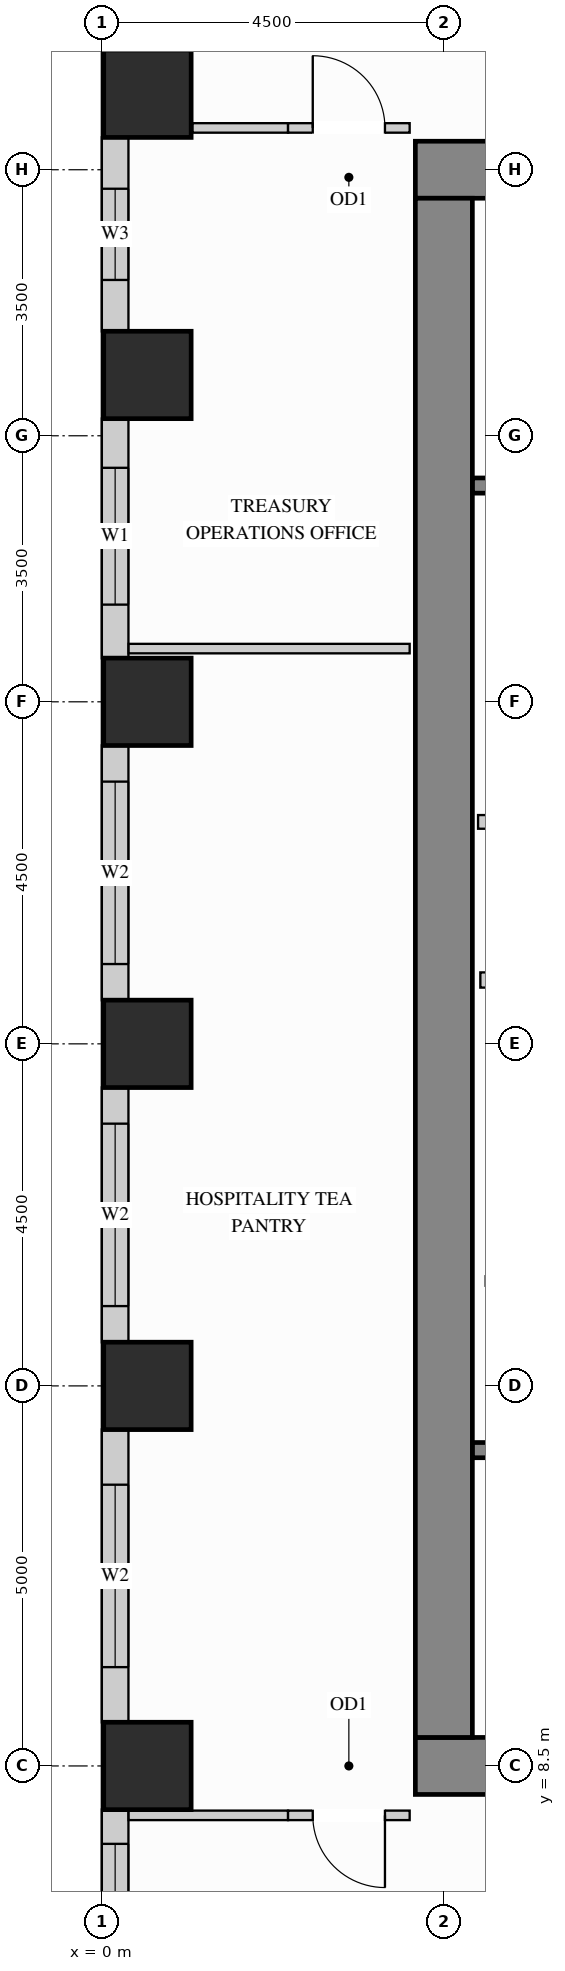
"""IFC4 building model, lengths in metres.
Left out: names, types, materials, properties, quantities, classifications, styles, units other than length and angle.
Written with IfcOpenShell. Run it as: python <this file> out.ifc"""

import sys

from ifc_helpers import new_model, si_unit, direction, frame, frame_2d, origin, origin_2d, place, context, subcontext, project, spatial, rectangle, extrude, source, transform, mapped, element, fill, save


model = new_model("IFC4")
c1 = context("Model", 3, precision=1e-05, world=origin(), true_north=direction((0.0, 1.0)))
c2 = subcontext(c1, "Body", "Model", "MODEL_VIEW")
j1 = project(units=[si_unit("LENGTHUNIT", "METRE"), si_unit("PLANEANGLEUNIT", "RADIAN")], contexts=[c1])
p1 = place(None, origin())
s1 = spatial("IfcSite", under=j1, at=p1, CompositionType="ELEMENT")
p2 = place(p1, origin())
s2 = spatial("IfcBuilding", under=s1, at=p2, CompositionType="ELEMENT")
p3 = place(p2, frame((0.0, 0.0, 124.2)))
s3 = spatial("IfcBuildingStorey", under=s2, at=p3, CompositionType="ELEMENT", Elevation=124.2)
m1 = source(origin(), c2, "Body", "SweptSolid", [
    extrude(rectangle(XDim=1.15, YDim=1.15, at=origin_2d()), origin(), (0.0, 0.0, 1.0), 3.38),
])
for number, where, z_axis, x_axis in (
    (1, (0.6, 13.5, 0.0), (0.0, 0.0, 1.0), (1.0, 0.0, 0.0)),
    (2, (0.6, 18.0, 0.0), (0.0, 0.0, 1.0), (1.0, 0.0, 0.0)),
    (3, (0.6, 22.5, 0.0), (0.0, 0.0, 1.0), (1.0, 0.0, 0.0)),
    (4, (0.6, 26.8, 0.0), (0.0, 0.0, 1.0), (1.0, 0.0, 0.0)),
    (5, (0.6, 30.5, 0.0), (0.0, 0.0, 1.0), (1.0, 0.0, 0.0)),
    (6, (0.6, 8.5, 0.0), (0.0, 0.0, 1.0), (1.0, 0.0, 0.0)),
):
    element("IfcColumn", number, at=place(p3, frame(where, z_axis=z_axis, x_axis=x_axis)), inside=s3, PredefinedType="COLUMN", context=c2, shape_type="MappedRepresentation", body=[
        mapped(m1, transform((0.0, 0.0, 0.0), x_axis=(1.0, 0.0, 0.0), y_axis=(0.0, 1.0, 0.0), z_axis=(0.0, 0.0, 1.0))),
    ])
m2 = source(origin(), c2, "Body", "SweptSolid", [
    extrude(rectangle(XDim=10.75, YDim=0.75, at=frame_2d((5.375, 0.0))), origin(), (0.0, 0.0, 1.0), 3.38),
])
for number, where, z_axis, x_axis in (
    (7, (4.125, 29.5, 0.0), (0.0, 0.0, 1.0), (1.0, 0.0, 0.0)),
    (8, (4.125, 8.5, 0.0), (0.0, 0.0, 1.0), (1.0, 0.0, 0.0)),
):
    element("IfcWall", number, at=place(p3, frame(where, z_axis=z_axis, x_axis=x_axis)), inside=s3, PredefinedType="SHEAR", context=c2, shape_type="MappedRepresentation", body=[
        mapped(m2, transform((0.0, 0.0, 0.0), x_axis=(1.0, 0.0, 0.0), y_axis=(0.0, 1.0, 0.0), z_axis=(0.0, 0.0, 1.0))),
    ])
m3 = source(origin(), c2, "Body", "SweptSolid", [
    extrude(rectangle(XDim=20.25, YDim=0.75, at=frame_2d((10.125, 0.0))), origin(), (0.0, 0.0, 1.0), 3.38),
])
p4 = place(p3, frame((4.5, 8.875, 0.0), z_axis=(0.0, 0.0, 1.0), x_axis=(0.0, 1.0, 0.0)))
e9 = element("IfcWall", 9, at=p4, inside=s3, PredefinedType="SHEAR", context=c2, shape_type="MappedRepresentation", body=[
    mapped(m3, transform((0.0, 0.0, 0.0), x_axis=(1.0, 0.0, 0.0), y_axis=(0.0, 1.0, 0.0), z_axis=(0.0, 0.0, 1.0))),
])
p5 = place(p3, frame((0.175, 29.927, 0.0), z_axis=(0.0, 0.0, 1.0), x_axis=(0.0, -1.0, 0.0)))
e10 = element("IfcWall", 10, at=p5, inside=s3, PredefinedType="SOLIDWALL", context=c2, shape_type="SweptSolid", body=[
    extrude(rectangle(XDim=2.554, YDim=0.35, at=frame_2d((1.277, 0.0))), origin(), (0.0, 0.0, 1.0), 3.365),
])
p6 = place(p5, frame((0.677, 0.0, 0.78)))
e11 = element("IfcOpeningElement", 11, at=p6, cuts=e10, PredefinedType="OPENING", context=c2, shape_type="SweptSolid", body=[
    extrude(rectangle(XDim=1.2, YDim=2.1, at=frame_2d((0.6, 1.05))), frame((0.0, 0.185, 0.0), z_axis=(0.0, -1.0, 0.0), x_axis=(1.0, 0.0, 0.0)), (0.0, 0.0, 1.0), 0.37),
])
p7 = place(p3, frame((0.175, 26.227, 0.0), z_axis=(0.0, 0.0, 1.0), x_axis=(0.0, -1.0, 0.0)))
e12 = element("IfcWall", 12, at=p7, inside=s3, PredefinedType="SOLIDWALL", context=c2, shape_type="SweptSolid", body=[
    extrude(rectangle(XDim=3.154, YDim=0.35, at=frame_2d((1.577, 0.0))), origin(), (0.0, 0.0, 1.0), 3.365),
])
p8 = place(p7, frame((0.648, 0.0, 0.78)))
e13 = element("IfcOpeningElement", 13, at=p8, cuts=e12, PredefinedType="OPENING", context=c2, shape_type="SweptSolid", body=[
    extrude(rectangle(XDim=1.8, YDim=2.1, at=frame_2d((0.9, 1.05))), frame((0.0, 0.185, 0.0), z_axis=(0.0, -1.0, 0.0), x_axis=(1.0, 0.0, 0.0)), (0.0, 0.0, 1.0), 0.37),
])
p9 = place(p3, frame((0.175, 21.927, 0.0), z_axis=(0.0, 0.0, 1.0), x_axis=(0.0, -1.0, 0.0)))
e14 = element("IfcWall", 14, at=p9, inside=s3, PredefinedType="SOLIDWALL", context=c2, shape_type="SweptSolid", body=[
    extrude(rectangle(XDim=3.354, YDim=0.35, at=frame_2d((1.677, 0.0))), origin(), (0.0, 0.0, 1.0), 3.365),
])
p10 = place(p9, frame((0.477, 0.0, 0.78)))
e15 = element("IfcOpeningElement", 15, at=p10, cuts=e14, PredefinedType="OPENING", context=c2, shape_type="SweptSolid", body=[
    extrude(rectangle(XDim=2.4, YDim=2.1, at=frame_2d((1.2, 1.05))), frame((0.0, 0.185, 0.0), z_axis=(0.0, -1.0, 0.0), x_axis=(1.0, 0.0, 0.0)), (0.0, 0.0, 1.0), 0.37),
])
p11 = place(p3, frame((0.175, 17.427, 0.0), z_axis=(0.0, 0.0, 1.0), x_axis=(0.0, -1.0, 0.0)))
e16 = element("IfcWall", 16, at=p11, inside=s3, PredefinedType="SOLIDWALL", context=c2, shape_type="SweptSolid", body=[
    extrude(rectangle(XDim=3.354, YDim=0.35, at=frame_2d((1.677, 0.0))), origin(), (0.0, 0.0, 1.0), 3.365),
])
p12 = place(p11, frame((0.477, 0.0, 0.78)))
e17 = element("IfcOpeningElement", 17, at=p12, cuts=e16, PredefinedType="OPENING", context=c2, shape_type="SweptSolid", body=[
    extrude(rectangle(XDim=2.4, YDim=2.1, at=frame_2d((1.2, 1.05))), frame((0.0, 0.185, 0.0), z_axis=(0.0, -1.0, 0.0), x_axis=(1.0, 0.0, 0.0)), (0.0, 0.0, 1.0), 0.37),
])
p13 = place(p3, frame((0.175, 12.927, 0.0), z_axis=(0.0, 0.0, 1.0), x_axis=(0.0, -1.0, 0.0)))
e18 = element("IfcWall", 18, at=p13, inside=s3, PredefinedType="SOLIDWALL", context=c2, shape_type="SweptSolid", body=[
    extrude(rectangle(XDim=3.854, YDim=0.35, at=frame_2d((1.927, 0.0))), origin(), (0.0, 0.0, 1.0), 3.365),
])
p14 = place(p13, frame((0.727, 0.0, 0.78)))
e19 = element("IfcOpeningElement", 19, at=p14, cuts=e18, PredefinedType="OPENING", context=c2, shape_type="SweptSolid", body=[
    extrude(rectangle(XDim=2.4, YDim=2.1, at=frame_2d((1.2, 1.05))), frame((0.0, 0.185, 0.0), z_axis=(0.0, -1.0, 0.0), x_axis=(1.0, 0.0, 0.0)), (0.0, 0.0, 1.0), 0.37),
])
p15 = place(p3, frame((0.175, 7.927, 0.0), z_axis=(0.0, 0.0, 1.0), x_axis=(0.0, -1.0, 0.0)))
e20 = element("IfcWall", 20, at=p15, inside=s3, PredefinedType="SOLIDWALL", context=c2, shape_type="SweptSolid", body=[
    extrude(rectangle(XDim=3.854, YDim=0.35, at=frame_2d((1.927, 0.0))), origin(), (0.0, 0.0, 1.0), 3.365),
])
p16 = place(p15, frame((0.452, 0.0, 0.78)))
e21 = element("IfcOpeningElement", 21, at=p16, cuts=e20, PredefinedType="OPENING", context=c2, shape_type="SweptSolid", body=[
    extrude(rectangle(XDim=2.4, YDim=2.1, at=frame_2d((1.2, 1.05))), frame((0.0, 0.185, 0.0), z_axis=(0.0, -1.0, 0.0), x_axis=(1.0, 0.0, 0.0)), (0.0, 0.0, 1.0), 0.37),
])
m4 = source(origin(), c2, "Body", "SweptSolid", [
    extrude(rectangle(XDim=2.2, YDim=0.18, at=frame_2d((1.1, 0.0))), origin(), (0.0, 0.0, 1.0), 3.365),
])
p17 = place(p3, frame((4.95, 20.92, 0.0), z_axis=(0.0, 0.0, 1.0), x_axis=(1.0, 0.0, 0.0)))
e22 = element("IfcWall", 22, at=p17, inside=s3, PredefinedType="PARTITIONING", context=c2, shape_type="MappedRepresentation", body=[
    mapped(m4, transform((0.0, 0.0, 0.0), x_axis=(1.0, 0.0, 0.0), y_axis=(0.0, 1.0, 0.0), z_axis=(0.0, 0.0, 1.0))),
])
p18 = place(p3, frame((5.05, 14.88, 0.0), z_axis=(0.0, 0.0, 1.0), x_axis=(1.0, 0.0, 0.0)))
e23 = element("IfcWall", 23, at=p18, inside=s3, PredefinedType="PARTITIONING", context=c2, shape_type="SweptSolid", body=[
    extrude(rectangle(XDim=2.35, YDim=0.125, at=frame_2d((1.175, 0.0))), origin(), (0.0, 0.0, 1.0), 3.365),
])
p19 = place(p18, frame((0.7, 0.0, 0.0)))
e24 = element("IfcOpeningElement", 24, at=p19, cuts=e23, PredefinedType="OPENING", context=c2, shape_type="SweptSolid", body=[
    extrude(rectangle(XDim=0.85, YDim=2.1, at=frame_2d((0.425, 1.05))), frame((0.0, 0.073, 0.0), z_axis=(0.0, -1.0, 0.0), x_axis=(1.0, 0.0, 0.0)), (0.0, 0.0, 1.0), 0.145),
])
m5 = source(origin(), c2, "Body", "SweptSolid", [
    extrude(rectangle(XDim=1.26, YDim=0.125, at=frame_2d((0.63, 0.0))), origin(), (0.0, 0.0, 1.0), 3.365),
])
p20 = place(p3, frame((1.19, 30.05, 0.0), z_axis=(0.0, 0.0, 1.0), x_axis=(1.0, 0.0, 0.0)))
e25 = element("IfcWall", 25, at=p20, inside=s3, PredefinedType="PARTITIONING", context=c2, shape_type="MappedRepresentation", body=[
    mapped(m5, transform((0.0, 0.0, 0.0), x_axis=(1.0, 0.0, 0.0), y_axis=(0.0, 1.0, 0.0), z_axis=(0.0, 0.0, 1.0))),
])
p21 = place(p3, frame((2.45, 30.05, 0.0), z_axis=(0.0, 0.0, 1.0), x_axis=(1.0, 0.0, 0.0)))
e26 = element("IfcWall", 26, at=p21, inside=s3, PredefinedType="PARTITIONING", context=c2, shape_type="SweptSolid", body=[
    extrude(rectangle(XDim=1.6, YDim=0.125, at=frame_2d((0.8, 0.0))), origin(), (0.0, 0.0, 1.0), 3.365),
])
p22 = place(p21, frame((0.325, 0.0, 0.0)))
e27 = element("IfcOpeningElement", 27, at=p22, cuts=e26, PredefinedType="OPENING", context=c2, shape_type="SweptSolid", body=[
    extrude(rectangle(XDim=0.95, YDim=2.15, at=frame_2d((0.475, 1.075))), frame((0.0, 0.073, 0.0), z_axis=(0.0, -1.0, 0.0), x_axis=(1.0, 0.0, 0.0)), (0.0, 0.0, 1.0), 0.145),
])
m6 = source(origin(), c2, "Body", "SweptSolid", [
    extrude(rectangle(XDim=2.098, YDim=0.125, at=frame_2d((1.049, 0.0))), origin(), (0.0, 0.0, 1.0), 3.365),
])
p23 = place(p3, frame((0.352, 7.85, 0.0), z_axis=(0.0, 0.0, 1.0), x_axis=(1.0, 0.0, 0.0)))
e28 = element("IfcWall", 28, at=p23, inside=s3, PredefinedType="PARTITIONING", context=c2, shape_type="MappedRepresentation", body=[
    mapped(m6, transform((0.0, 0.0, 0.0), x_axis=(1.0, 0.0, 0.0), y_axis=(0.0, 1.0, 0.0), z_axis=(0.0, 0.0, 1.0))),
])
p24 = place(p3, frame((2.45, 7.85, 0.0), z_axis=(0.0, 0.0, 1.0), x_axis=(1.0, 0.0, 0.0)))
e29 = element("IfcWall", 29, at=p24, inside=s3, PredefinedType="PARTITIONING", context=c2, shape_type="SweptSolid", body=[
    extrude(rectangle(XDim=1.6, YDim=0.125, at=frame_2d((0.8, 0.0))), origin(), (0.0, 0.0, 1.0), 3.365),
])
p25 = place(p24, frame((0.325, 0.0, 0.0)))
e30 = element("IfcOpeningElement", 30, at=p25, cuts=e29, PredefinedType="OPENING", context=c2, shape_type="SweptSolid", body=[
    extrude(rectangle(XDim=0.95, YDim=2.15, at=frame_2d((0.475, 1.075))), frame((0.0, 0.073, 0.0), z_axis=(0.0, -1.0, 0.0), x_axis=(1.0, 0.0, 0.0)), (0.0, 0.0, 1.0), 0.145),
])
m7 = source(origin(), c2, "Body", "SweptSolid", [
    extrude(rectangle(XDim=3.698, YDim=0.125, at=frame_2d((1.849, 0.0))), origin(), (0.0, 0.0, 1.0), 3.365),
])
p26 = place(p3, frame((0.352, 23.2, 0.0), z_axis=(0.0, 0.0, 1.0), x_axis=(1.0, 0.0, 0.0)))
e31 = element("IfcWall", 31, at=p26, inside=s3, PredefinedType="PARTITIONING", context=c2, shape_type="MappedRepresentation", body=[
    mapped(m7, transform((0.0, 0.0, 0.0), x_axis=(1.0, 0.0, 0.0), y_axis=(0.0, 1.0, 0.0), z_axis=(0.0, 0.0, 1.0))),
])
m8 = source(origin(), c2, "Body", "SweptSolid", [
    extrude(rectangle(XDim=2.09, YDim=0.2, at=frame_2d((1.045, 0.0))), origin(), (0.0, 0.0, 1.0), 3.365),
])
p27 = place(p3, frame((4.98, 18.84, 0.0), z_axis=(0.0, 0.0, 1.0), x_axis=(1.0, 0.0, 0.0)))
e32 = element("IfcWall", 32, at=p27, inside=s3, PredefinedType="PARTITIONING", context=c2, shape_type="MappedRepresentation", body=[
    mapped(m8, transform((0.0, 0.0, 0.0), x_axis=(1.0, 0.0, 0.0), y_axis=(0.0, 1.0, 0.0), z_axis=(0.0, 0.0, 1.0))),
])
p28 = place(p3, frame((4.877, 12.655, 0.0), z_axis=(0.0, 0.0, 1.0), x_axis=(1.0, 0.0, 0.0)))
e33 = element("IfcWall", 33, at=p28, inside=s3, PredefinedType="SHEAR", context=c2, shape_type="SweptSolid", body=[
    extrude(rectangle(XDim=7.528, YDim=0.2, at=frame_2d((3.764, 0.0))), origin(), (0.0, 0.0, 1.0), 3.38),
])
p29 = place(p28, frame((0.4, 0.0, 0.0)))
e34 = element("IfcOpeningElement", 34, at=p29, cuts=e33, PredefinedType="OPENING", context=c2, shape_type="SweptSolid", body=[
    extrude(rectangle(XDim=1.1, YDim=2.15, at=frame_2d((0.55, 1.075))), frame((0.0, 0.11, 0.0), z_axis=(0.0, -1.0, 0.0), x_axis=(1.0, 0.0, 0.0)), (0.0, 0.0, 1.0), 0.22),
])
p30 = place(p3, frame((4.877, 25.345, 0.0), z_axis=(0.0, 0.0, 1.0), x_axis=(1.0, 0.0, 0.0)))
e35 = element("IfcWall", 35, at=p30, inside=s3, PredefinedType="SHEAR", context=c2, shape_type="SweptSolid", body=[
    extrude(rectangle(XDim=7.528, YDim=0.2, at=frame_2d((3.764, 0.0))), origin(), (0.0, 0.0, 1.0), 3.38),
])
p31 = place(p30, frame((0.4, 0.0, 0.0)))
e36 = element("IfcOpeningElement", 36, at=p31, cuts=e35, PredefinedType="OPENING", context=c2, shape_type="SweptSolid", body=[
    extrude(rectangle(XDim=1.1, YDim=2.15, at=frame_2d((0.55, 1.075))), frame((0.0, 0.11, 0.0), z_axis=(0.0, -1.0, 0.0), x_axis=(1.0, 0.0, 0.0)), (0.0, 0.0, 1.0), 0.22),
])
m9 = source(origin(), c2, "Body", "SweptSolid", [
    extrude(rectangle(XDim=0.95, YDim=2.15, at=frame_2d((0.475, 1.075))), frame((0.0, 0.025, 0.0), z_axis=(0.0, -1.0, 0.0), x_axis=(1.0, 0.0, 0.0)), (0.0, 0.0, 1.0), 0.05),
])
p32 = place(p25, origin())
e37 = element("IfcDoor", 37, at=p32, inside=s3, OperationType="SINGLE_SWING_RIGHT", PredefinedType="DOOR", context=c2, shape_type="MappedRepresentation", body=[
    mapped(m9, transform((0.0, 0.0, 0.0), x_axis=(1.0, 0.0, 0.0), y_axis=(0.0, 1.0, 0.0), z_axis=(0.0, 0.0, 1.0))),
])
fill(e30, e37)
p33 = place(p22, origin())
e38 = element("IfcDoor", 38, at=p33, inside=s3, OperationType="SINGLE_SWING_LEFT", PredefinedType="DOOR", context=c2, shape_type="MappedRepresentation", body=[
    mapped(m9, transform((0.0, 0.0, 0.0), x_axis=(1.0, 0.0, 0.0), y_axis=(0.0, 1.0, 0.0), z_axis=(0.0, 0.0, 1.0))),
])
fill(e27, e38)
m10 = source(origin(), c2, "Body", "SweptSolid", [
    extrude(rectangle(XDim=1.8, YDim=2.1, at=frame_2d((0.9, 1.05))), frame((0.0, 0.03, 0.0), z_axis=(0.0, -1.0, 0.0), x_axis=(1.0, 0.0, 0.0)), (0.0, 0.0, 1.0), 0.06),
])
p34 = place(p8, origin())
e39 = element("IfcWindow", 39, at=p34, inside=s3, PartitioningType="SINGLE_PANEL", PredefinedType="WINDOW", context=c2, shape_type="MappedRepresentation", body=[
    mapped(m10, transform((0.0, 0.0, 0.0), x_axis=(1.0, 0.0, 0.0), y_axis=(0.0, 1.0, 0.0), z_axis=(0.0, 0.0, 1.0))),
])
fill(e13, e39)
m11 = source(origin(), c2, "Body", "SweptSolid", [
    extrude(rectangle(XDim=2.4, YDim=2.1, at=frame_2d((1.2, 1.05))), frame((0.0, 0.03, 0.0), z_axis=(0.0, -1.0, 0.0), x_axis=(1.0, 0.0, 0.0)), (0.0, 0.0, 1.0), 0.06),
])
p35 = place(p10, origin())
e40 = element("IfcWindow", 40, at=p35, inside=s3, PartitioningType="SINGLE_PANEL", PredefinedType="WINDOW", context=c2, shape_type="MappedRepresentation", body=[
    mapped(m11, transform((0.0, 0.0, 0.0), x_axis=(1.0, 0.0, 0.0), y_axis=(0.0, 1.0, 0.0), z_axis=(0.0, 0.0, 1.0))),
])
fill(e15, e40)
p36 = place(p12, origin())
e41 = element("IfcWindow", 41, at=p36, inside=s3, PartitioningType="SINGLE_PANEL", PredefinedType="WINDOW", context=c2, shape_type="MappedRepresentation", body=[
    mapped(m11, transform((0.0, 0.0, 0.0), x_axis=(1.0, 0.0, 0.0), y_axis=(0.0, 1.0, 0.0), z_axis=(0.0, 0.0, 1.0))),
])
fill(e17, e41)
p37 = place(p14, origin())
e42 = element("IfcWindow", 42, at=p37, inside=s3, PartitioningType="SINGLE_PANEL", PredefinedType="WINDOW", context=c2, shape_type="MappedRepresentation", body=[
    mapped(m11, transform((0.0, 0.0, 0.0), x_axis=(1.0, 0.0, 0.0), y_axis=(0.0, 1.0, 0.0), z_axis=(0.0, 0.0, 1.0))),
])
fill(e19, e42)
p38 = place(p16, origin())
e43 = element("IfcWindow", 43, at=p38, inside=s3, PartitioningType="SINGLE_PANEL", PredefinedType="WINDOW", context=c2, shape_type="MappedRepresentation", body=[
    mapped(m11, transform((0.0, 0.0, 0.0), x_axis=(1.0, 0.0, 0.0), y_axis=(0.0, 1.0, 0.0), z_axis=(0.0, 0.0, 1.0))),
])
fill(e21, e43)
m12 = source(origin(), c2, "Body", "SweptSolid", [
    extrude(rectangle(XDim=1.2, YDim=2.1, at=frame_2d((0.6, 1.05))), frame((0.0, 0.03, 0.0), z_axis=(0.0, -1.0, 0.0), x_axis=(1.0, 0.0, 0.0)), (0.0, 0.0, 1.0), 0.06),
])
p39 = place(p6, origin())
e44 = element("IfcWindow", 44, at=p39, inside=s3, PartitioningType="SINGLE_PANEL", PredefinedType="WINDOW", context=c2, shape_type="MappedRepresentation", body=[
    mapped(m12, transform((0.0, 0.0, 0.0), x_axis=(1.0, 0.0, 0.0), y_axis=(0.0, 1.0, 0.0), z_axis=(0.0, 0.0, 1.0))),
])
fill(e11, e44)
save(model, sys.argv[1])
